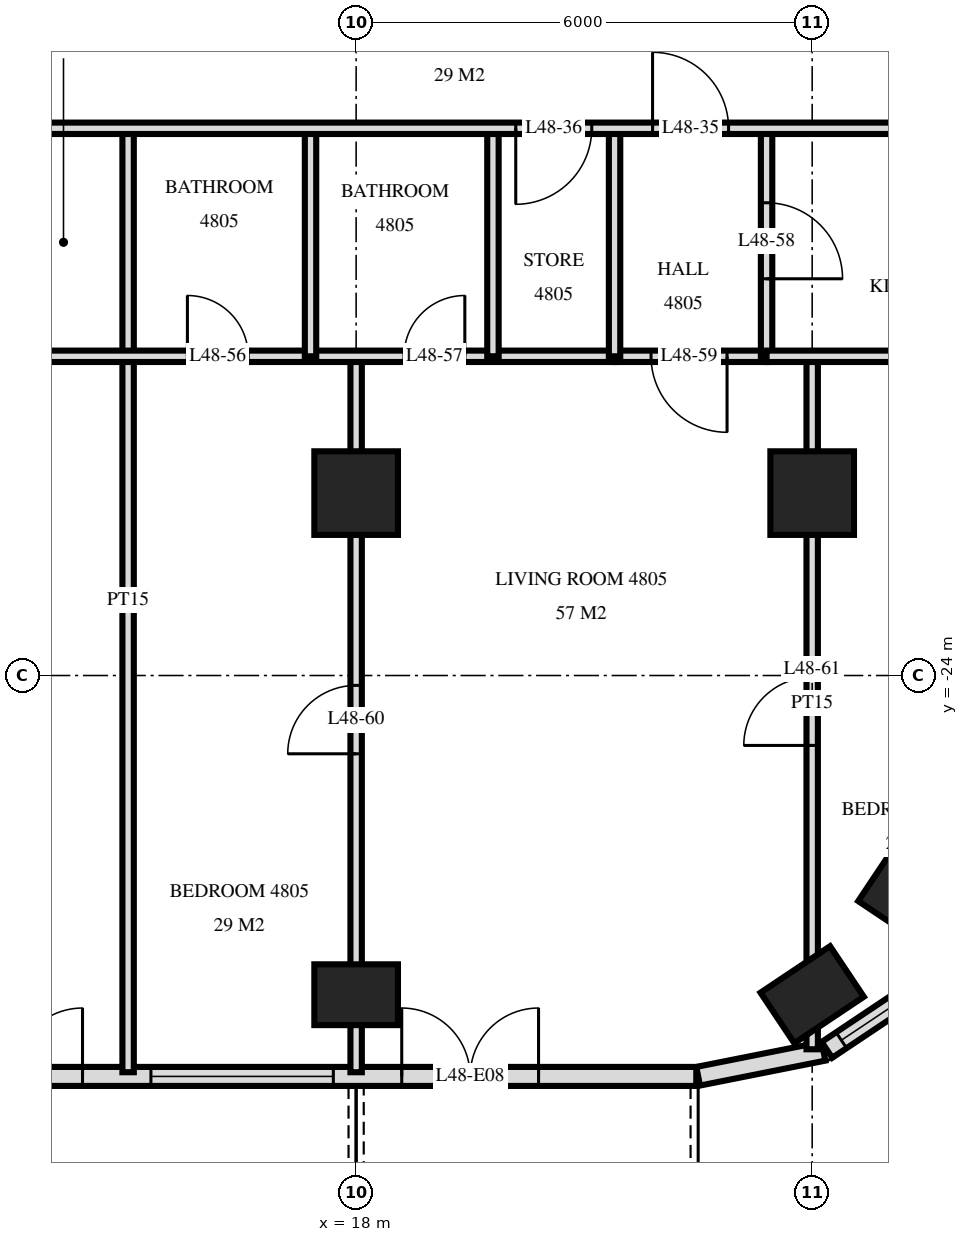
"""IFC4 building model, lengths in metres.
Left out: names, types, materials, properties, quantities, classifications, styles, units other than length and angle.
Written with IfcOpenShell. Run it as: python <this file> out.ifc"""

import sys

from ifc_helpers import new_model, si_unit, direction, frame, frame_2d, origin, origin_2d, place, context, subcontext, project, spatial, rectangle, extrude, element, fill, save


model = new_model("IFC4")
c1 = context("Model", 3, precision=1e-05, world=origin(), true_north=direction((0.0, 1.0)))
c2 = subcontext(c1, "Body", "Model", "MODEL_VIEW")
j1 = project(units=[si_unit("LENGTHUNIT", "METRE"), si_unit("PLANEANGLEUNIT", "RADIAN")], contexts=[c1])
p1 = place(None, origin())
s1 = spatial("IfcSite", under=j1, at=p1, CompositionType="ELEMENT")
p2 = place(p1, origin())
s2 = spatial("IfcBuilding", under=s1, at=p2, CompositionType="ELEMENT")
p3 = place(p2, frame((0.0, 0.0, 187.1)))
s3 = spatial("IfcBuildingStorey", under=s2, at=p3, CompositionType="ELEMENT", Elevation=187.1)
p4 = place(p3, frame((18.0, -28.2, 0.0), z_axis=(0.0, 0.0, 1.0), x_axis=(1.0, 0.0, 0.0)))
e1 = element("IfcColumn", 1, at=p4, inside=s3, PredefinedType="COLUMN", context=c2, shape_type="SweptSolid", body=[
    extrude(rectangle(XDim=1.1, YDim=0.8, at=origin_2d()), origin(), (0.0, 0.0, 1.0), 3.5),
])
p5 = place(p3, frame((18.0, -21.6, 0.0), z_axis=(0.0, 0.0, 1.0), x_axis=(1.0, 0.0, 0.0)))
e2 = element("IfcColumn", 2, at=p5, inside=s3, PredefinedType="COLUMN", context=c2, shape_type="SweptSolid", body=[
    extrude(rectangle(XDim=1.1, YDim=1.1, at=origin_2d()), origin(), (0.0, 0.0, 1.0), 3.5),
])
p6 = place(p3, frame((24.0, -28.2, 0.0), z_axis=(0.0, 0.0, 1.0), x_axis=(0.831459915646, 0.555584744817, 0.0)))
e3 = element("IfcColumn", 3, at=p6, inside=s3, PredefinedType="COLUMN", context=c2, shape_type="SweptSolid", body=[
    extrude(rectangle(XDim=1.1, YDim=0.8, at=origin_2d()), origin(), (0.0, 0.0, 1.0), 3.5),
])
p7 = place(p3, frame((24.0, -21.6, 0.0), z_axis=(0.0, 0.0, 1.0), x_axis=(1.0, 0.0, 0.0)))
e4 = element("IfcColumn", 4, at=p7, inside=s3, PredefinedType="COLUMN", context=c2, shape_type="SweptSolid", body=[
    extrude(rectangle(XDim=1.1, YDim=1.1, at=origin_2d()), origin(), (0.0, 0.0, 1.0), 3.5),
])
p8 = place(p3, frame((25.244, -26.733, 0.0), z_axis=(0.0, 0.0, 1.0), x_axis=(0.555584744817, 0.831459915646, 0.0)))
e5 = element("IfcColumn", 5, at=p8, inside=s3, PredefinedType="COLUMN", context=c2, shape_type="SweptSolid", body=[
    extrude(rectangle(XDim=1.1, YDim=0.8, at=origin_2d()), origin(), (0.0, 0.0, 1.0), 3.5),
])
p9 = place(p3, frame((-22.475, -29.275, 0.0), z_axis=(0.0, 0.0, 1.0), x_axis=(1.0, 0.0, 0.0)))
e6 = element("IfcWall", 6, at=p9, inside=s3, PredefinedType="SOLIDWALL", context=c2, shape_type="SweptSolid", body=[
    extrude(rectangle(XDim=44.951, YDim=0.25, at=frame_2d((22.475, 0.0))), origin(), (0.0, 0.0, 1.0), 3.22),
])
p10 = place(p9, frame((0.575, 0.0, 0.0)))
e7 = element("IfcOpeningElement", 7, at=p10, cuts=e6, PredefinedType="OPENING", context=c2, shape_type="SweptSolid", body=[
    extrude(rectangle(XDim=1.8, YDim=2.4, at=frame_2d((0.9, 1.2))), frame((0.0, 0.135, 0.0), z_axis=(0.0, -1.0, 0.0), x_axis=(1.0, 0.0, 0.0)), (0.0, 0.0, 1.0), 0.27),
])
p11 = place(p9, frame((4.775, 0.0, 0.9)))
e8 = element("IfcOpeningElement", 8, at=p11, cuts=e6, PredefinedType="OPENING", context=c2, shape_type="SweptSolid", body=[
    extrude(rectangle(XDim=2.4, YDim=1.5, at=frame_2d((1.2, 0.75))), frame((0.0, 0.135, 0.0), z_axis=(0.0, -1.0, 0.0), x_axis=(1.0, 0.0, 0.0)), (0.0, 0.0, 1.0), 0.27),
])
p12 = place(p9, frame((8.075, 0.0, 0.0)))
e9 = element("IfcOpeningElement", 9, at=p12, cuts=e6, PredefinedType="OPENING", context=c2, shape_type="SweptSolid", body=[
    extrude(rectangle(XDim=1.8, YDim=2.4, at=frame_2d((0.9, 1.2))), frame((0.0, 0.135, 0.0), z_axis=(0.0, -1.0, 0.0), x_axis=(1.0, 0.0, 0.0)), (0.0, 0.0, 1.0), 0.27),
])
p13 = place(p9, frame((11.075, 0.0, 0.0)))
e10 = element("IfcOpeningElement", 10, at=p13, cuts=e6, PredefinedType="OPENING", context=c2, shape_type="SweptSolid", body=[
    extrude(rectangle(XDim=1.8, YDim=2.4, at=frame_2d((0.9, 1.2))), frame((0.0, 0.135, 0.0), z_axis=(0.0, -1.0, 0.0), x_axis=(1.0, 0.0, 0.0)), (0.0, 0.0, 1.0), 0.27),
])
p14 = place(p9, frame((13.775, 0.0, 0.9)))
e11 = element("IfcOpeningElement", 11, at=p14, cuts=e6, PredefinedType="OPENING", context=c2, shape_type="SweptSolid", body=[
    extrude(rectangle(XDim=2.4, YDim=1.5, at=frame_2d((1.2, 0.75))), frame((0.0, 0.135, 0.0), z_axis=(0.0, -1.0, 0.0), x_axis=(1.0, 0.0, 0.0)), (0.0, 0.0, 1.0), 0.27),
])
p15 = place(p9, frame((20.075, 0.0, 0.0)))
e12 = element("IfcOpeningElement", 12, at=p15, cuts=e6, PredefinedType="OPENING", context=c2, shape_type="SweptSolid", body=[
    extrude(rectangle(XDim=1.8, YDim=2.4, at=frame_2d((0.9, 1.2))), frame((0.0, 0.135, 0.0), z_axis=(0.0, -1.0, 0.0), x_axis=(1.0, 0.0, 0.0)), (0.0, 0.0, 1.0), 0.27),
])
p16 = place(p9, frame((23.075, 0.0, 0.0)))
e13 = element("IfcOpeningElement", 13, at=p16, cuts=e6, PredefinedType="OPENING", context=c2, shape_type="SweptSolid", body=[
    extrude(rectangle(XDim=1.8, YDim=2.4, at=frame_2d((0.9, 1.2))), frame((0.0, 0.135, 0.0), z_axis=(0.0, -1.0, 0.0), x_axis=(1.0, 0.0, 0.0)), (0.0, 0.0, 1.0), 0.27),
])
p17 = place(p9, frame((29.075, 0.0, 0.0)))
e14 = element("IfcOpeningElement", 14, at=p17, cuts=e6, PredefinedType="OPENING", context=c2, shape_type="SweptSolid", body=[
    extrude(rectangle(XDim=1.8, YDim=2.4, at=frame_2d((0.9, 1.2))), frame((0.0, 0.135, 0.0), z_axis=(0.0, -1.0, 0.0), x_axis=(1.0, 0.0, 0.0)), (0.0, 0.0, 1.0), 0.27),
])
p18 = place(p9, frame((31.775, 0.0, 0.9)))
e15 = element("IfcOpeningElement", 15, at=p18, cuts=e6, PredefinedType="OPENING", context=c2, shape_type="SweptSolid", body=[
    extrude(rectangle(XDim=2.4, YDim=1.5, at=frame_2d((1.2, 0.75))), frame((0.0, 0.135, 0.0), z_axis=(0.0, -1.0, 0.0), x_axis=(1.0, 0.0, 0.0)), (0.0, 0.0, 1.0), 0.27),
])
p19 = place(p9, frame((35.075, 0.0, 0.0)))
e16 = element("IfcOpeningElement", 16, at=p19, cuts=e6, PredefinedType="OPENING", context=c2, shape_type="SweptSolid", body=[
    extrude(rectangle(XDim=1.8, YDim=2.4, at=frame_2d((0.9, 1.2))), frame((0.0, 0.135, 0.0), z_axis=(0.0, -1.0, 0.0), x_axis=(1.0, 0.0, 0.0)), (0.0, 0.0, 1.0), 0.27),
])
p20 = place(p9, frame((37.775, 0.0, 0.9)))
e17 = element("IfcOpeningElement", 17, at=p20, cuts=e6, PredefinedType="OPENING", context=c2, shape_type="SweptSolid", body=[
    extrude(rectangle(XDim=2.4, YDim=1.5, at=frame_2d((1.2, 0.75))), frame((0.0, 0.135, 0.0), z_axis=(0.0, -1.0, 0.0), x_axis=(1.0, 0.0, 0.0)), (0.0, 0.0, 1.0), 0.27),
])
p21 = place(p9, frame((41.075, 0.0, 0.0)))
e18 = element("IfcOpeningElement", 18, at=p21, cuts=e6, PredefinedType="OPENING", context=c2, shape_type="SweptSolid", body=[
    extrude(rectangle(XDim=1.8, YDim=2.4, at=frame_2d((0.9, 1.2))), frame((0.0, 0.135, 0.0), z_axis=(0.0, -1.0, 0.0), x_axis=(1.0, 0.0, 0.0)), (0.0, 0.0, 1.0), 0.27),
])
p22 = place(p3, frame((22.5, -29.273, 0.0), z_axis=(0.0, 0.0, 1.0), x_axis=(0.980775640221, 0.19513878023, 0.0)))
e19 = element("IfcWall", 19, at=p22, inside=s3, PredefinedType="SOLIDWALL", context=c2, shape_type="SweptSolid", body=[
    extrude(rectangle(XDim=1.681, YDim=0.25, at=frame_2d((0.841, 0.0))), origin(), (0.0, 0.0, 1.0), 3.22),
])
p23 = place(p3, frame((24.194, -28.926, 0.0), z_axis=(0.0, 0.0, 1.0), x_axis=(0.831482937015, 0.55555029066, 0.0)))
e20 = element("IfcWall", 20, at=p23, inside=s3, PredefinedType="SOLIDWALL", context=c2, shape_type="SweptSolid", body=[
    extrude(rectangle(XDim=1.656, YDim=0.25, at=frame_2d((0.828, 0.0))), origin(), (0.0, 0.0, 1.0), 3.22),
])
p24 = place(p23, frame((0.228, 0.0, 0.9)))
e21 = element("IfcOpeningElement", 21, at=p24, cuts=e20, PredefinedType="OPENING", context=c2, shape_type="SweptSolid", body=[
    extrude(rectangle(XDim=1.2, YDim=1.5, at=frame_2d((0.6, 0.75))), frame((0.0, 0.135, 0.0), z_axis=(0.0, -1.0, 0.0), x_axis=(1.0, 0.0, 0.0)), (0.0, 0.0, 1.0), 0.27),
])
p25 = place(p3, frame((24.0, -28.918, 0.0), z_axis=(0.0, 0.0, 1.0), x_axis=(0.0, 1.0, 0.0)))
e22 = element("IfcWall", 22, at=p25, inside=s3, PredefinedType="PARTITIONING", context=c2, shape_type="SweptSolid", body=[
    extrude(rectangle(XDim=9.118, YDim=0.15, at=frame_2d((4.559, 0.0))), origin(), (0.0, 0.0, 1.0), 3.22),
])
p26 = place(p25, frame((3.998, 0.0, 0.0)))
e23 = element("IfcOpeningElement", 23, at=p26, cuts=e22, PredefinedType="OPENING", context=c2, shape_type="SweptSolid", body=[
    extrude(rectangle(XDim=0.9, YDim=2.1, at=frame_2d((0.45, 1.05))), frame((0.0, 0.085, 0.0), z_axis=(0.0, -1.0, 0.0), x_axis=(1.0, 0.0, 0.0)), (0.0, 0.0, 1.0), 0.17),
])
p27 = place(p3, frame((23.4, -19.8, 0.0), z_axis=(0.0, 0.0, 1.0), x_axis=(0.0, 1.0, 0.0)))
e24 = element("IfcWall", 24, at=p27, inside=s3, PredefinedType="PARTITIONING", context=c2, shape_type="SweptSolid", body=[
    extrude(rectangle(XDim=3.0, YDim=0.15, at=frame_2d((1.5, 0.0))), origin(), (0.0, 0.0, 1.0), 3.22),
])
p28 = place(p27, frame((1.02, 0.0, 0.0)))
e25 = element("IfcOpeningElement", 25, at=p28, cuts=e24, PredefinedType="OPENING", context=c2, shape_type="SweptSolid", body=[
    extrude(rectangle(XDim=1.0, YDim=2.1, at=frame_2d((0.5, 1.05))), frame((0.0, 0.085, 0.0), z_axis=(0.0, -1.0, 0.0), x_axis=(1.0, 0.0, 0.0)), (0.0, 0.0, 1.0), 0.17),
])
for number, where, z_axis, x_axis in (
    (26, (21.4, -19.8, 0.0), (0.0, 0.0, 1.0), (0.0, 1.0, 0.0)),
    (27, (19.8, -19.8, 0.0), (0.0, 0.0, 1.0), (0.0, 1.0, 0.0)),
):
    element("IfcWall", number, at=place(p3, frame(where, z_axis=z_axis, x_axis=x_axis)), inside=s3, PredefinedType="PARTITIONING", context=c2, shape_type="SweptSolid", body=[
        extrude(rectangle(XDim=3.0, YDim=0.15, at=frame_2d((1.5, 0.0))), origin(), (0.0, 0.0, 1.0), 3.22),
    ])
p29 = place(p3, frame((18.0, -29.22, 0.0), z_axis=(0.0, 0.0, 1.0), x_axis=(0.0, 1.0, 0.0)))
e28 = element("IfcWall", 28, at=p29, inside=s3, PredefinedType="PARTITIONING", context=c2, shape_type="SweptSolid", body=[
    extrude(rectangle(XDim=9.42, YDim=0.15, at=frame_2d((4.71, 0.0))), origin(), (0.0, 0.0, 1.0), 3.22),
])
p30 = place(p29, frame((4.19, 0.0, 0.0)))
e29 = element("IfcOpeningElement", 29, at=p30, cuts=e28, PredefinedType="OPENING", context=c2, shape_type="SweptSolid", body=[
    extrude(rectangle(XDim=0.9, YDim=2.1, at=frame_2d((0.45, 1.05))), frame((0.0, 0.085, 0.0), z_axis=(0.0, -1.0, 0.0), x_axis=(1.0, 0.0, 0.0)), (0.0, 0.0, 1.0), 0.17),
])
p31 = place(p3, frame((17.4, -19.8, 0.0), z_axis=(0.0, 0.0, 1.0), x_axis=(0.0, 1.0, 0.0)))
e30 = element("IfcWall", 30, at=p31, inside=s3, PredefinedType="PARTITIONING", context=c2, shape_type="SweptSolid", body=[
    extrude(rectangle(XDim=3.0, YDim=0.15, at=frame_2d((1.5, 0.0))), origin(), (0.0, 0.0, 1.0), 3.22),
])
p32 = place(p3, frame((15.0, -29.22, 0.0), z_axis=(0.0, 0.0, 1.0), x_axis=(0.0, 1.0, 0.0)))
e31 = element("IfcWall", 31, at=p32, inside=s3, PredefinedType="PARTITIONING", context=c2, shape_type="SweptSolid", body=[
    extrude(rectangle(XDim=12.42, YDim=0.15, at=frame_2d((6.21, 0.0))), origin(), (0.0, 0.0, 1.0), 3.22),
])
p33 = place(p3, frame((21.4, -19.8, 0.0), z_axis=(0.0, 0.0, 1.0), x_axis=(1.0, 0.0, 0.0)))
e32 = element("IfcWall", 32, at=p33, inside=s3, PredefinedType="PARTITIONING", context=c2, shape_type="SweptSolid", body=[
    extrude(rectangle(XDim=2.0, YDim=0.15, at=frame_2d((1.0, 0.0))), origin(), (0.0, 0.0, 1.0), 3.22),
])
p34 = place(p33, frame((0.48, 0.0, 0.0)))
e33 = element("IfcOpeningElement", 33, at=p34, cuts=e32, PredefinedType="OPENING", context=c2, shape_type="SweptSolid", body=[
    extrude(rectangle(XDim=1.0, YDim=2.1, at=frame_2d((0.5, 1.05))), frame((0.0, 0.085, 0.0), z_axis=(0.0, -1.0, 0.0), x_axis=(1.0, 0.0, 0.0)), (0.0, 0.0, 1.0), 0.17),
])
p35 = place(p3, frame((13.3, -19.8, 0.0), z_axis=(0.0, 0.0, 1.0), x_axis=(1.0, 0.0, 0.0)))
e34 = element("IfcWall", 34, at=p35, inside=s3, PredefinedType="PARTITIONING", context=c2, shape_type="SweptSolid", body=[
    extrude(rectangle(XDim=8.1, YDim=0.15, at=frame_2d((4.05, 0.0))), origin(), (0.0, 0.0, 1.0), 3.22),
])
p36 = place(p35, frame((2.48, 0.0, 0.0)))
e35 = element("IfcOpeningElement", 35, at=p36, cuts=e34, PredefinedType="OPENING", context=c2, shape_type="SweptSolid", body=[
    extrude(rectangle(XDim=0.8, YDim=2.1, at=frame_2d((0.4, 1.05))), frame((0.0, 0.085, 0.0), z_axis=(0.0, -1.0, 0.0), x_axis=(1.0, 0.0, 0.0)), (0.0, 0.0, 1.0), 0.17),
])
p37 = place(p35, frame((5.33, 0.0, 0.0)))
e36 = element("IfcOpeningElement", 36, at=p37, cuts=e34, PredefinedType="OPENING", context=c2, shape_type="SweptSolid", body=[
    extrude(rectangle(XDim=0.8, YDim=2.1, at=frame_2d((0.4, 1.05))), frame((0.0, 0.085, 0.0), z_axis=(0.0, -1.0, 0.0), x_axis=(1.0, 0.0, 0.0)), (0.0, 0.0, 1.0), 0.17),
])
p38 = place(p3, frame((23.4, -19.8, 0.0), z_axis=(0.0, 0.0, 1.0), x_axis=(1.0, 0.0, 0.0)))
e37 = element("IfcWall", 37, at=p38, inside=s3, PredefinedType="PARTITIONING", context=c2, shape_type="SweptSolid", body=[
    extrude(rectangle(XDim=3.42, YDim=0.15, at=frame_2d((1.71, 0.0))), origin(), (0.0, 0.0, 1.0), 3.22),
])
p39 = place(p3, frame((-26.82, -16.8, 0.0), z_axis=(0.0, 0.0, 1.0), x_axis=(1.0, 0.0, 0.0)))
e38 = element("IfcWall", 38, at=p39, inside=s3, PredefinedType="PARTITIONING", context=c2, shape_type="SweptSolid", body=[
    extrude(rectangle(XDim=53.64, YDim=0.15, at=frame_2d((26.82, 0.0))), origin(), (0.0, 0.0, 1.0), 3.22),
])
p40 = place(p39, frame((11.97, 0.0, 0.0)))
e39 = element("IfcOpeningElement", 39, at=p40, cuts=e38, PredefinedType="OPENING", context=c2, shape_type="SweptSolid", body=[
    extrude(rectangle(XDim=1.0, YDim=2.1, at=frame_2d((0.5, 1.05))), frame((0.0, 0.085, 0.0), z_axis=(0.0, -1.0, 0.0), x_axis=(1.0, 0.0, 0.0)), (0.0, 0.0, 1.0), 0.17),
])
p41 = place(p39, frame((10.67, 0.0, 0.0)))
e40 = element("IfcOpeningElement", 40, at=p41, cuts=e38, PredefinedType="OPENING", context=c2, shape_type="SweptSolid", body=[
    extrude(rectangle(XDim=1.0, YDim=2.1, at=frame_2d((0.5, 1.05))), frame((0.0, 0.085, 0.0), z_axis=(0.0, -1.0, 0.0), x_axis=(1.0, 0.0, 0.0)), (0.0, 0.0, 1.0), 0.17),
])
p42 = place(p39, frame((3.22, 0.0, 0.0)))
e41 = element("IfcOpeningElement", 41, at=p42, cuts=e38, PredefinedType="OPENING", context=c2, shape_type="SweptSolid", body=[
    extrude(rectangle(XDim=1.0, YDim=2.1, at=frame_2d((0.5, 1.05))), frame((0.0, 0.085, 0.0), z_axis=(0.0, -1.0, 0.0), x_axis=(1.0, 0.0, 0.0)), (0.0, 0.0, 1.0), 0.17),
])
p43 = place(p39, frame((5.02, 0.0, 0.0)))
e42 = element("IfcOpeningElement", 42, at=p43, cuts=e38, PredefinedType="OPENING", context=c2, shape_type="SweptSolid", body=[
    extrude(rectangle(XDim=1.0, YDim=2.1, at=frame_2d((0.5, 1.05))), frame((0.0, 0.085, 0.0), z_axis=(0.0, -1.0, 0.0), x_axis=(1.0, 0.0, 0.0)), (0.0, 0.0, 1.0), 0.17),
])
p44 = place(p39, frame((38.97, 0.0, 0.0)))
e43 = element("IfcOpeningElement", 43, at=p44, cuts=e38, PredefinedType="OPENING", context=c2, shape_type="SweptSolid", body=[
    extrude(rectangle(XDim=1.0, YDim=2.1, at=frame_2d((0.5, 1.05))), frame((0.0, 0.085, 0.0), z_axis=(0.0, -1.0, 0.0), x_axis=(1.0, 0.0, 0.0)), (0.0, 0.0, 1.0), 0.17),
])
p45 = place(p39, frame((48.72, 0.0, 0.0)))
e44 = element("IfcOpeningElement", 44, at=p45, cuts=e38, PredefinedType="OPENING", context=c2, shape_type="SweptSolid", body=[
    extrude(rectangle(XDim=1.0, YDim=2.1, at=frame_2d((0.5, 1.05))), frame((0.0, 0.085, 0.0), z_axis=(0.0, -1.0, 0.0), x_axis=(1.0, 0.0, 0.0)), (0.0, 0.0, 1.0), 0.17),
])
p46 = place(p39, frame((46.92, 0.0, 0.0)))
e45 = element("IfcOpeningElement", 45, at=p46, cuts=e38, PredefinedType="OPENING", context=c2, shape_type="SweptSolid", body=[
    extrude(rectangle(XDim=1.0, YDim=2.1, at=frame_2d((0.5, 1.05))), frame((0.0, 0.085, 0.0), z_axis=(0.0, -1.0, 0.0), x_axis=(1.0, 0.0, 0.0)), (0.0, 0.0, 1.0), 0.17),
])
p47 = place(p39, frame((18.32, 0.0, 0.0)))
e46 = element("IfcOpeningElement", 46, at=p47, cuts=e38, PredefinedType="OPENING", context=c2, shape_type="SweptSolid", body=[
    extrude(rectangle(XDim=1.0, YDim=2.1, at=frame_2d((0.5, 1.05))), frame((0.0, 0.085, 0.0), z_axis=(0.0, -1.0, 0.0), x_axis=(1.0, 0.0, 0.0)), (0.0, 0.0, 1.0), 0.17),
])
p48 = place(p39, frame((26.32, 0.0, 0.0)))
e47 = element("IfcOpeningElement", 47, at=p48, cuts=e38, PredefinedType="OPENING", context=c2, shape_type="SweptSolid", body=[
    extrude(rectangle(XDim=1.0, YDim=2.1, at=frame_2d((0.5, 1.05))), frame((0.0, 0.085, 0.0), z_axis=(0.0, -1.0, 0.0), x_axis=(1.0, 0.0, 0.0)), (0.0, 0.0, 1.0), 0.17),
])
p49 = place(p39, frame((34.32, 0.0, 0.0)))
e48 = element("IfcOpeningElement", 48, at=p49, cuts=e38, PredefinedType="OPENING", context=c2, shape_type="SweptSolid", body=[
    extrude(rectangle(XDim=1.0, YDim=2.1, at=frame_2d((0.5, 1.05))), frame((0.0, 0.085, 0.0), z_axis=(0.0, -1.0, 0.0), x_axis=(1.0, 0.0, 0.0)), (0.0, 0.0, 1.0), 0.17),
])
p50 = place(p24, origin())
e49 = element("IfcWindow", 49, at=p50, inside=s3, PartitioningType="SINGLE_PANEL", PredefinedType="WINDOW", context=c2, shape_type="SweptSolid", body=[
    extrude(rectangle(XDim=1.2, YDim=1.5, at=frame_2d((0.6, 0.75))), frame((0.0, 0.03, 0.0), z_axis=(0.0, -1.0, 0.0), x_axis=(1.0, 0.0, 0.0)), (0.0, 0.0, 1.0), 0.06),
])
fill(e21, e49)
p51 = place(p19, origin())
e50 = element("IfcDoor", 50, at=p51, inside=s3, OperationType="DOUBLE_DOOR_SINGLE_SWING", PredefinedType="DOOR", context=c2, shape_type="SweptSolid", body=[
    extrude(rectangle(XDim=1.8, YDim=2.4, at=frame_2d((0.9, 1.2))), frame((0.0, 0.025, 0.0), z_axis=(0.0, -1.0, 0.0), x_axis=(1.0, 0.0, 0.0)), (0.0, 0.0, 1.0), 0.05),
])
fill(e16, e50)
p52 = place(p20, origin())
e51 = element("IfcWindow", 51, at=p52, inside=s3, PartitioningType="SINGLE_PANEL", PredefinedType="WINDOW", context=c2, shape_type="SweptSolid", body=[
    extrude(rectangle(XDim=2.4, YDim=1.5, at=frame_2d((1.2, 0.75))), frame((0.0, 0.03, 0.0), z_axis=(0.0, -1.0, 0.0), x_axis=(1.0, 0.0, 0.0)), (0.0, 0.0, 1.0), 0.06),
])
fill(e17, e51)
p53 = place(p21, origin())
e52 = element("IfcDoor", 52, at=p53, inside=s3, OperationType="DOUBLE_DOOR_SINGLE_SWING", PredefinedType="DOOR", context=c2, shape_type="SweptSolid", body=[
    extrude(rectangle(XDim=1.8, YDim=2.4, at=frame_2d((0.9, 1.2))), frame((0.0, 0.025, 0.0), z_axis=(0.0, -1.0, 0.0), x_axis=(1.0, 0.0, 0.0)), (0.0, 0.0, 1.0), 0.05),
])
fill(e18, e52)
p54 = place(p45, origin())
e53 = element("IfcDoor", 53, at=p54, inside=s3, OperationType="SINGLE_SWING_RIGHT", PredefinedType="DOOR", context=c2, shape_type="SweptSolid", body=[
    extrude(rectangle(XDim=1.0, YDim=2.1, at=frame_2d((0.5, 1.05))), frame((0.0, 0.025, 0.0), z_axis=(0.0, -1.0, 0.0), x_axis=(1.0, 0.0, 0.0)), (0.0, 0.0, 1.0), 0.05),
])
fill(e44, e53)
p55 = place(p46, frame((0.5, 0.0, 0.0), z_axis=(0.0, 0.0, 1.0), x_axis=(-1.0, 0.0, 0.0)))
e54 = element("IfcDoor", 54, at=p55, inside=s3, OperationType="SINGLE_SWING_LEFT", PredefinedType="DOOR", context=c2, shape_type="SweptSolid", body=[
    extrude(rectangle(XDim=1.0, YDim=2.1, at=frame_2d((0.0, 1.05))), frame((0.0, -0.025, 0.0), z_axis=(0.0, 1.0, 0.0), x_axis=(-1.0, 0.0, 0.0)), (0.0, 0.0, 1.0), 0.05),
])
fill(e45, e54)
p56 = place(p36, origin())
e55 = element("IfcDoor", 55, at=p56, inside=s3, OperationType="SINGLE_SWING_RIGHT", PredefinedType="DOOR", context=c2, shape_type="SweptSolid", body=[
    extrude(rectangle(XDim=0.8, YDim=2.1, at=frame_2d((0.4, 1.05))), frame((0.0, 0.025, 0.0), z_axis=(0.0, -1.0, 0.0), x_axis=(1.0, 0.0, 0.0)), (0.0, 0.0, 1.0), 0.05),
])
fill(e35, e55)
p57 = place(p37, origin())
e56 = element("IfcDoor", 56, at=p57, inside=s3, OperationType="SINGLE_SWING_LEFT", PredefinedType="DOOR", context=c2, shape_type="SweptSolid", body=[
    extrude(rectangle(XDim=0.8, YDim=2.1, at=frame_2d((0.4, 1.05))), frame((0.0, 0.025, 0.0), z_axis=(0.0, -1.0, 0.0), x_axis=(1.0, 0.0, 0.0)), (0.0, 0.0, 1.0), 0.05),
])
fill(e36, e56)
p58 = place(p28, frame((0.5, 0.0, 0.0), z_axis=(0.0, 0.0, 1.0), x_axis=(-1.0, 0.0, 0.0)))
e57 = element("IfcDoor", 57, at=p58, inside=s3, OperationType="SINGLE_SWING_LEFT", PredefinedType="DOOR", context=c2, shape_type="SweptSolid", body=[
    extrude(rectangle(XDim=1.0, YDim=2.1, at=frame_2d((0.0, 1.05))), frame((0.0, -0.025, 0.0), z_axis=(0.0, 1.0, 0.0), x_axis=(-1.0, 0.0, 0.0)), (0.0, 0.0, 1.0), 0.05),
])
fill(e25, e57)
p59 = place(p34, frame((0.5, 0.0, 0.0), z_axis=(0.0, 0.0, 1.0), x_axis=(-1.0, 0.0, 0.0)))
e58 = element("IfcDoor", 58, at=p59, inside=s3, OperationType="SINGLE_SWING_RIGHT", PredefinedType="DOOR", context=c2, shape_type="SweptSolid", body=[
    extrude(rectangle(XDim=1.0, YDim=2.1, at=frame_2d((0.0, 1.05))), frame((0.0, -0.025, 0.0), z_axis=(0.0, 1.0, 0.0), x_axis=(-1.0, 0.0, 0.0)), (0.0, 0.0, 1.0), 0.05),
])
fill(e33, e58)
p60 = place(p30, origin())
e59 = element("IfcDoor", 59, at=p60, inside=s3, OperationType="SINGLE_SWING_RIGHT", PredefinedType="DOOR", context=c2, shape_type="SweptSolid", body=[
    extrude(rectangle(XDim=0.9, YDim=2.1, at=frame_2d((0.45, 1.05))), frame((0.0, 0.025, 0.0), z_axis=(0.0, -1.0, 0.0), x_axis=(1.0, 0.0, 0.0)), (0.0, 0.0, 1.0), 0.05),
])
fill(e29, e59)
p61 = place(p26, origin())
e60 = element("IfcDoor", 60, at=p61, inside=s3, OperationType="SINGLE_SWING_RIGHT", PredefinedType="DOOR", context=c2, shape_type="SweptSolid", body=[
    extrude(rectangle(XDim=0.9, YDim=2.1, at=frame_2d((0.45, 1.05))), frame((0.0, 0.025, 0.0), z_axis=(0.0, -1.0, 0.0), x_axis=(1.0, 0.0, 0.0)), (0.0, 0.0, 1.0), 0.05),
])
fill(e23, e60)
save(model, sys.argv[1])
